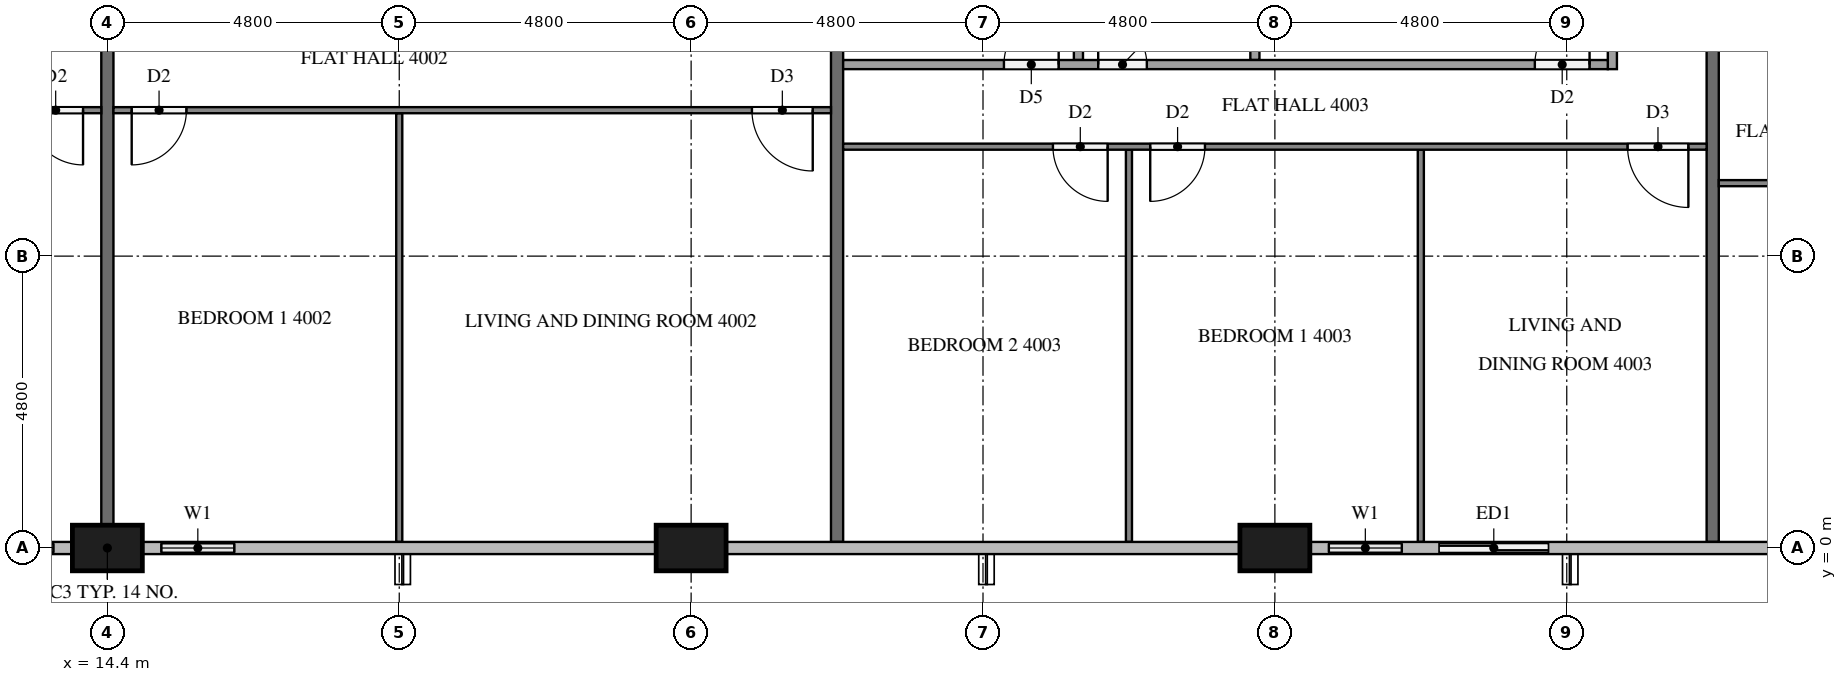
"""IFC4 building model, lengths in metres.
Left out: names, types, materials, properties, quantities, classifications, styles, units other than length and angle.
Written with IfcOpenShell. Run it as: python <this file> out.ifc"""

import sys

from ifc_helpers import new_model, si_unit, direction, frame, frame_2d, origin, origin_2d, place, context, subcontext, project, spatial, rectangle, extrude, element, fill, save


model = new_model("IFC4")
c1 = context("Model", 3, precision=1e-05, world=origin(), true_north=direction((0.0, 1.0)))
c2 = subcontext(c1, "Body", "Model", "MODEL_VIEW")
j1 = project(units=[si_unit("LENGTHUNIT", "METRE"), si_unit("PLANEANGLEUNIT", "RADIAN")], contexts=[c1])
p1 = place(None, origin())
s1 = spatial("IfcSite", under=j1, at=p1, CompositionType="ELEMENT")
p2 = place(p1, origin())
s2 = spatial("IfcBuilding", under=s1, at=p2, CompositionType="ELEMENT")
p3 = place(p2, frame((0.0, 0.0, 156.0)))
s3 = spatial("IfcBuildingStorey", under=s2, at=p3, CompositionType="ELEMENT", Elevation=156.0)
for number, where, z_axis, x_axis in (
    (1, (14.4, 0.0, 0.0), (0.0, 0.0, 1.0), (1.0, 0.0, 0.0)),
    (2, (24.0, 0.0, 0.0), (0.0, 0.0, 1.0), (1.0, 0.0, 0.0)),
    (3, (33.6, 0.0, 0.0), (0.0, 0.0, 1.0), (1.0, 0.0, 0.0)),
):
    element("IfcColumn", number, at=place(p3, frame(where, z_axis=z_axis, x_axis=x_axis)), inside=s3, PredefinedType="COLUMN", context=c2, shape_type="SweptSolid", body=[
        extrude(rectangle(XDim=1.15, YDim=0.75, at=origin_2d()), origin(), (0.0, 0.0, 1.0), 3.2),
    ])
p4 = place(p3, frame((12.0, 0.0, 0.0), z_axis=(0.0, 0.0, 1.0), x_axis=(1.0, 0.0, 0.0)))
e4 = element("IfcWall", 4, at=p4, inside=s3, PredefinedType="SOLIDWALL", context=c2, shape_type="SweptSolid", body=[
    extrude(rectangle(XDim=1.825, YDim=0.15, at=frame_2d((0.913, 0.0))), origin(), (0.0, 0.0, 1.0), 3.2),
])
p5 = place(p4, frame((0.312, 0.0, 0.9)))
e5 = element("IfcOpeningElement", 5, at=p5, cuts=e4, PredefinedType="OPENING", context=c2, shape_type="SweptSolid", body=[
    extrude(rectangle(XDim=1.2, YDim=1.4, at=frame_2d((0.6, 0.7))), frame((0.0, 0.085, 0.0), z_axis=(0.0, -1.0, 0.0), x_axis=(1.0, 0.0, 0.0)), (0.0, 0.0, 1.0), 0.17),
])
p6 = place(p3, frame((14.975, 0.0, 0.0), z_axis=(0.0, 0.0, 1.0), x_axis=(1.0, 0.0, 0.0)))
e6 = element("IfcWall", 6, at=p6, inside=s3, PredefinedType="SOLIDWALL", context=c2, shape_type="SweptSolid", body=[
    extrude(rectangle(XDim=1.825, YDim=0.15, at=frame_2d((0.913, 0.0))), origin(), (0.0, 0.0, 1.0), 3.2),
])
p7 = place(p6, frame((0.312, 0.0, 0.9)))
e7 = element("IfcOpeningElement", 7, at=p7, cuts=e6, PredefinedType="OPENING", context=c2, shape_type="SweptSolid", body=[
    extrude(rectangle(XDim=1.2, YDim=1.4, at=frame_2d((0.6, 0.7))), frame((0.0, 0.085, 0.0), z_axis=(0.0, -1.0, 0.0), x_axis=(1.0, 0.0, 0.0)), (0.0, 0.0, 1.0), 0.17),
])
p8 = place(p3, frame((34.175, 0.0, 0.0), z_axis=(0.0, 0.0, 1.0), x_axis=(1.0, 0.0, 0.0)))
e8 = element("IfcWall", 8, at=p8, inside=s3, PredefinedType="SOLIDWALL", context=c2, shape_type="SweptSolid", body=[
    extrude(rectangle(XDim=4.225, YDim=0.15, at=frame_2d((2.112, 0.0))), origin(), (0.0, 0.0, 1.0), 3.2),
])
p9 = place(p8, frame((0.312, 0.0, 0.9)))
e9 = element("IfcOpeningElement", 9, at=p9, cuts=e8, PredefinedType="OPENING", context=c2, shape_type="SweptSolid", body=[
    extrude(rectangle(XDim=1.2, YDim=1.4, at=frame_2d((0.6, 0.7))), frame((0.0, 0.085, 0.0), z_axis=(0.0, -1.0, 0.0), x_axis=(1.0, 0.0, 0.0)), (0.0, 0.0, 1.0), 0.17),
])
p10 = place(p8, frame((2.125, 0.0, 0.0)))
e10 = element("IfcOpeningElement", 10, at=p10, cuts=e8, PredefinedType="OPENING", context=c2, shape_type="SweptSolid", body=[
    extrude(rectangle(XDim=1.8, YDim=2.4, at=frame_2d((0.9, 1.2))), frame((0.0, 0.085, 0.0), z_axis=(0.0, -1.0, 0.0), x_axis=(1.0, 0.0, 0.0)), (0.0, 0.0, 1.0), 0.17),
])
p11 = place(p3, frame((14.4, 11.9, 0.0), z_axis=(0.0, 0.0, 1.0), x_axis=(0.0, -1.0, 0.0)))
e11 = element("IfcWall", 11, at=p11, inside=s3, PredefinedType="PARTITIONING", context=c2, shape_type="SweptSolid", body=[
    extrude(rectangle(XDim=11.525, YDim=0.2, at=frame_2d((5.762, 0.0))), origin(), (0.0, 0.0, 1.0), 3.2),
])
for number, where, z_axis, x_axis in (
    (12, (26.4, 11.9, 0.0), (0.0, 0.0, 1.0), (0.0, -1.0, 0.0)),
    (13, (40.8, 11.9, 0.0), (0.0, 0.0, 1.0), (0.0, -1.0, 0.0)),
):
    element("IfcWall", number, at=place(p3, frame(where, z_axis=z_axis, x_axis=x_axis)), inside=s3, PredefinedType="PARTITIONING", context=c2, shape_type="SweptSolid", body=[
        extrude(rectangle(XDim=11.8, YDim=0.2, at=frame_2d((5.9, 0.0))), origin(), (0.0, 0.0, 1.0), 3.2),
    ])
p12 = place(p3, frame((14.3, 7.2, 0.0), z_axis=(0.0, 0.0, 1.0), x_axis=(-1.0, 0.0, 0.0)))
e14 = element("IfcWall", 14, at=p12, inside=s3, PredefinedType="PARTITIONING", context=c2, shape_type="SweptSolid", body=[
    extrude(rectangle(XDim=14.2, YDim=0.1, at=frame_2d((7.1, 0.0))), origin(), (0.0, 0.0, 1.0), 3.2),
])
p13 = place(p12, frame((0.3, 0.0, 0.0)))
e15 = element("IfcOpeningElement", 15, at=p13, cuts=e14, PredefinedType="OPENING", context=c2, shape_type="SweptSolid", body=[
    extrude(rectangle(XDim=0.9, YDim=2.1, at=frame_2d((0.45, 1.05))), frame((0.0, 0.06, 0.0), z_axis=(0.0, -1.0, 0.0), x_axis=(1.0, 0.0, 0.0)), (0.0, 0.0, 1.0), 0.12),
])
p14 = place(p12, frame((8.25, 0.0, 0.0)))
e16 = element("IfcOpeningElement", 16, at=p14, cuts=e14, PredefinedType="OPENING", context=c2, shape_type="SweptSolid", body=[
    extrude(rectangle(XDim=0.9, YDim=2.1, at=frame_2d((0.45, 1.05))), frame((0.0, 0.06, 0.0), z_axis=(0.0, -1.0, 0.0), x_axis=(1.0, 0.0, 0.0)), (0.0, 0.0, 1.0), 0.12),
])
p15 = place(p12, frame((9.85, 0.0, 0.0)))
e17 = element("IfcOpeningElement", 17, at=p15, cuts=e14, PredefinedType="OPENING", context=c2, shape_type="SweptSolid", body=[
    extrude(rectangle(XDim=1.0, YDim=2.1, at=frame_2d((0.5, 1.05))), frame((0.0, 0.06, 0.0), z_axis=(0.0, -1.0, 0.0), x_axis=(1.0, 0.0, 0.0)), (0.0, 0.0, 1.0), 0.12),
])
p16 = place(p3, frame((19.2, 7.15, 0.0), z_axis=(0.0, 0.0, 1.0), x_axis=(0.0, -1.0, 0.0)))
e18 = element("IfcWall", 18, at=p16, inside=s3, PredefinedType="PARTITIONING", context=c2, shape_type="SweptSolid", body=[
    extrude(rectangle(XDim=7.05, YDim=0.1, at=frame_2d((3.525, 0.0))), origin(), (0.0, 0.0, 1.0), 3.2),
])
p17 = place(p3, frame((26.3, 7.2, 0.0), z_axis=(0.0, 0.0, 1.0), x_axis=(-1.0, 0.0, 0.0)))
e19 = element("IfcWall", 19, at=p17, inside=s3, PredefinedType="PARTITIONING", context=c2, shape_type="SweptSolid", body=[
    extrude(rectangle(XDim=11.8, YDim=0.1, at=frame_2d((5.9, 0.0))), origin(), (0.0, 0.0, 1.0), 3.2),
])
p18 = place(p17, frame((10.6, 0.0, 0.0)))
e20 = element("IfcOpeningElement", 20, at=p18, cuts=e19, PredefinedType="OPENING", context=c2, shape_type="SweptSolid", body=[
    extrude(rectangle(XDim=0.9, YDim=2.1, at=frame_2d((0.45, 1.05))), frame((0.0, 0.06, 0.0), z_axis=(0.0, -1.0, 0.0), x_axis=(1.0, 0.0, 0.0)), (0.0, 0.0, 1.0), 0.12),
])
p19 = place(p17, frame((0.3, 0.0, 0.0)))
e21 = element("IfcOpeningElement", 21, at=p19, cuts=e19, PredefinedType="OPENING", context=c2, shape_type="SweptSolid", body=[
    extrude(rectangle(XDim=1.0, YDim=2.1, at=frame_2d((0.5, 1.05))), frame((0.0, 0.06, 0.0), z_axis=(0.0, -1.0, 0.0), x_axis=(1.0, 0.0, 0.0)), (0.0, 0.0, 1.0), 0.12),
])
for number, where, z_axis, x_axis in (
    (22, (36.0, 6.55, 0.0), (0.0, 0.0, 1.0), (0.0, -1.0, 0.0)),
    (23, (31.2, 6.55, 0.0), (0.0, 0.0, 1.0), (0.0, -1.0, 0.0)),
):
    element("IfcWall", number, at=place(p3, frame(where, z_axis=z_axis, x_axis=x_axis)), inside=s3, PredefinedType="PARTITIONING", context=c2, shape_type="SweptSolid", body=[
        extrude(rectangle(XDim=6.45, YDim=0.1, at=frame_2d((3.225, 0.0))), origin(), (0.0, 0.0, 1.0), 3.2),
    ])
p20 = place(p3, frame((40.7, 6.6, 0.0), z_axis=(0.0, 0.0, 1.0), x_axis=(-1.0, 0.0, 0.0)))
e24 = element("IfcWall", 24, at=p20, inside=s3, PredefinedType="PARTITIONING", context=c2, shape_type="SweptSolid", body=[
    extrude(rectangle(XDim=14.2, YDim=0.1, at=frame_2d((7.1, 0.0))), origin(), (0.0, 0.0, 1.0), 3.2),
])
p21 = place(p20, frame((0.3, 0.0, 0.0)))
e25 = element("IfcOpeningElement", 25, at=p21, cuts=e24, PredefinedType="OPENING", context=c2, shape_type="SweptSolid", body=[
    extrude(rectangle(XDim=1.0, YDim=2.1, at=frame_2d((0.5, 1.05))), frame((0.0, 0.06, 0.0), z_axis=(0.0, -1.0, 0.0), x_axis=(1.0, 0.0, 0.0)), (0.0, 0.0, 1.0), 0.12),
])
p22 = place(p20, frame((8.25, 0.0, 0.0)))
e26 = element("IfcOpeningElement", 26, at=p22, cuts=e24, PredefinedType="OPENING", context=c2, shape_type="SweptSolid", body=[
    extrude(rectangle(XDim=0.9, YDim=2.1, at=frame_2d((0.45, 1.05))), frame((0.0, 0.06, 0.0), z_axis=(0.0, -1.0, 0.0), x_axis=(1.0, 0.0, 0.0)), (0.0, 0.0, 1.0), 0.12),
])
p23 = place(p20, frame((9.85, 0.0, 0.0)))
e27 = element("IfcOpeningElement", 27, at=p23, cuts=e24, PredefinedType="OPENING", context=c2, shape_type="SweptSolid", body=[
    extrude(rectangle(XDim=0.9, YDim=2.1, at=frame_2d((0.45, 1.05))), frame((0.0, 0.06, 0.0), z_axis=(0.0, -1.0, 0.0), x_axis=(1.0, 0.0, 0.0)), (0.0, 0.0, 1.0), 0.12),
])
for number, where, z_axis, x_axis in (
    (28, (33.271, 11.9, 0.0), (0.0, 0.0, 1.0), (0.0, -1.0, 0.0)),
    (29, (30.369, 11.9, 0.0), (0.0, 0.0, 1.0), (0.0, -1.0, 0.0)),
):
    element("IfcWall", number, at=place(p3, frame(where, z_axis=z_axis, x_axis=x_axis)), inside=s3, PredefinedType="PARTITIONING", context=c2, shape_type="SweptSolid", body=[
        extrude(rectangle(XDim=3.875, YDim=0.15, at=frame_2d((1.938, 0.0))), origin(), (0.0, 0.0, 1.0), 3.2),
    ])
p24 = place(p3, frame((39.15, 11.9, 0.0), z_axis=(0.0, 0.0, 1.0), x_axis=(0.0, -1.0, 0.0)))
e30 = element("IfcWall", 30, at=p24, inside=s3, PredefinedType="PARTITIONING", context=c2, shape_type="SweptSolid", body=[
    extrude(rectangle(XDim=4.025, YDim=0.15, at=frame_2d((2.012, 0.0))), origin(), (0.0, 0.0, 1.0), 3.2),
])
p25 = place(p3, frame((26.5, 7.95, 0.0), z_axis=(0.0, 0.0, 1.0), x_axis=(1.0, 0.0, 0.0)))
e31 = element("IfcWall", 31, at=p25, inside=s3, PredefinedType="PARTITIONING", context=c2, shape_type="SweptSolid", body=[
    extrude(rectangle(XDim=12.575, YDim=0.15, at=frame_2d((6.288, 0.0))), origin(), (0.0, 0.0, 1.0), 3.2),
])
p26 = place(p25, frame((11.375, 0.0, 0.0)))
e32 = element("IfcOpeningElement", 32, at=p26, cuts=e31, PredefinedType="OPENING", context=c2, shape_type="SweptSolid", body=[
    extrude(rectangle(XDim=0.9, YDim=2.1, at=frame_2d((0.45, 1.05))), frame((0.0, 0.085, 0.0), z_axis=(0.0, -1.0, 0.0), x_axis=(1.0, 0.0, 0.0)), (0.0, 0.0, 1.0), 0.17),
])
p27 = place(p25, frame((4.194, 0.0, 0.0)))
e33 = element("IfcOpeningElement", 33, at=p27, cuts=e31, PredefinedType="OPENING", context=c2, shape_type="SweptSolid", body=[
    extrude(rectangle(XDim=0.8, YDim=2.1, at=frame_2d((0.4, 1.05))), frame((0.0, 0.085, 0.0), z_axis=(0.0, -1.0, 0.0), x_axis=(1.0, 0.0, 0.0)), (0.0, 0.0, 1.0), 0.17),
])
p28 = place(p25, frame((2.644, 0.0, 0.0)))
e34 = element("IfcOpeningElement", 34, at=p28, cuts=e31, PredefinedType="OPENING", context=c2, shape_type="SweptSolid", body=[
    extrude(rectangle(XDim=0.9, YDim=2.1, at=frame_2d((0.45, 1.05))), frame((0.0, 0.085, 0.0), z_axis=(0.0, -1.0, 0.0), x_axis=(1.0, 0.0, 0.0)), (0.0, 0.0, 1.0), 0.17),
])
p29 = place(p3, frame((57.5, 6.0, 0.0), z_axis=(0.0, 0.0, 1.0), x_axis=(-1.0, 0.0, 0.0)))
e35 = element("IfcWall", 35, at=p29, inside=s3, PredefinedType="PARTITIONING", context=c2, shape_type="SweptSolid", body=[
    extrude(rectangle(XDim=16.6, YDim=0.1, at=frame_2d((8.3, 0.0))), origin(), (0.0, 0.0, 1.0), 3.2),
])
p30 = place(p29, frame((9.85, 0.0, 0.0)))
e36 = element("IfcOpeningElement", 36, at=p30, cuts=e35, PredefinedType="OPENING", context=c2, shape_type="SweptSolid", body=[
    extrude(rectangle(XDim=1.0, YDim=2.1, at=frame_2d((0.5, 1.05))), frame((0.0, 0.06, 0.0), z_axis=(0.0, -1.0, 0.0), x_axis=(1.0, 0.0, 0.0)), (0.0, 0.0, 1.0), 0.12),
])
p31 = place(p29, frame((8.25, 0.0, 0.0)))
e37 = element("IfcOpeningElement", 37, at=p31, cuts=e35, PredefinedType="OPENING", context=c2, shape_type="SweptSolid", body=[
    extrude(rectangle(XDim=0.9, YDim=2.1, at=frame_2d((0.45, 1.05))), frame((0.0, 0.06, 0.0), z_axis=(0.0, -1.0, 0.0), x_axis=(1.0, 0.0, 0.0)), (0.0, 0.0, 1.0), 0.12),
])
p32 = place(p29, frame((0.5, 0.0, 0.0)))
e38 = element("IfcOpeningElement", 38, at=p32, cuts=e35, PredefinedType="OPENING", context=c2, shape_type="SweptSolid", body=[
    extrude(rectangle(XDim=0.9, YDim=2.1, at=frame_2d((0.45, 1.05))), frame((0.0, 0.06, 0.0), z_axis=(0.0, -1.0, 0.0), x_axis=(1.0, 0.0, 0.0)), (0.0, 0.0, 1.0), 0.12),
])
p33 = place(p5, origin())
e39 = element("IfcWindow", 39, at=p33, inside=s3, PartitioningType="SINGLE_PANEL", PredefinedType="WINDOW", context=c2, shape_type="SweptSolid", body=[
    extrude(rectangle(XDim=1.2, YDim=1.4, at=frame_2d((0.6, 0.7))), frame((0.0, 0.03, 0.0), z_axis=(0.0, -1.0, 0.0), x_axis=(1.0, 0.0, 0.0)), (0.0, 0.0, 1.0), 0.06),
])
fill(e5, e39)
p34 = place(p7, origin())
e40 = element("IfcWindow", 40, at=p34, inside=s3, PartitioningType="SINGLE_PANEL", PredefinedType="WINDOW", context=c2, shape_type="SweptSolid", body=[
    extrude(rectangle(XDim=1.2, YDim=1.4, at=frame_2d((0.6, 0.7))), frame((0.0, 0.03, 0.0), z_axis=(0.0, -1.0, 0.0), x_axis=(1.0, 0.0, 0.0)), (0.0, 0.0, 1.0), 0.06),
])
fill(e7, e40)
p35 = place(p9, origin())
e41 = element("IfcWindow", 41, at=p35, inside=s3, PartitioningType="SINGLE_PANEL", PredefinedType="WINDOW", context=c2, shape_type="SweptSolid", body=[
    extrude(rectangle(XDim=1.2, YDim=1.4, at=frame_2d((0.6, 0.7))), frame((0.0, 0.03, 0.0), z_axis=(0.0, -1.0, 0.0), x_axis=(1.0, 0.0, 0.0)), (0.0, 0.0, 1.0), 0.06),
])
fill(e9, e41)
p36 = place(p10, origin())
e42 = element("IfcDoor", 42, at=p36, inside=s3, OperationType="SLIDING_TO_LEFT", PredefinedType="DOOR", context=c2, shape_type="SweptSolid", body=[
    extrude(rectangle(XDim=1.8, YDim=2.4, at=frame_2d((0.9, 1.2))), frame((0.0, 0.025, 0.0), z_axis=(0.0, -1.0, 0.0), x_axis=(1.0, 0.0, 0.0)), (0.0, 0.0, 1.0), 0.05),
])
fill(e10, e42)
p37 = place(p13, origin())
e43 = element("IfcDoor", 43, at=p37, inside=s3, OperationType="SINGLE_SWING_LEFT", PredefinedType="DOOR", context=c2, shape_type="SweptSolid", body=[
    extrude(rectangle(XDim=0.9, YDim=2.1, at=frame_2d((0.45, 1.05))), frame((0.0, 0.025, 0.0), z_axis=(0.0, -1.0, 0.0), x_axis=(1.0, 0.0, 0.0)), (0.0, 0.0, 1.0), 0.05),
])
fill(e15, e43)
p38 = place(p18, origin())
e44 = element("IfcDoor", 44, at=p38, inside=s3, OperationType="SINGLE_SWING_RIGHT", PredefinedType="DOOR", context=c2, shape_type="SweptSolid", body=[
    extrude(rectangle(XDim=0.9, YDim=2.1, at=frame_2d((0.45, 1.05))), frame((0.0, 0.025, 0.0), z_axis=(0.0, -1.0, 0.0), x_axis=(1.0, 0.0, 0.0)), (0.0, 0.0, 1.0), 0.05),
])
fill(e20, e44)
p39 = place(p19, origin())
e45 = element("IfcDoor", 45, at=p39, inside=s3, OperationType="SINGLE_SWING_LEFT", PredefinedType="DOOR", context=c2, shape_type="SweptSolid", body=[
    extrude(rectangle(XDim=1.0, YDim=2.1, at=frame_2d((0.5, 1.05))), frame((0.0, 0.025, 0.0), z_axis=(0.0, -1.0, 0.0), x_axis=(1.0, 0.0, 0.0)), (0.0, 0.0, 1.0), 0.05),
])
fill(e21, e45)
p40 = place(p21, origin())
e46 = element("IfcDoor", 46, at=p40, inside=s3, OperationType="SINGLE_SWING_LEFT", PredefinedType="DOOR", context=c2, shape_type="SweptSolid", body=[
    extrude(rectangle(XDim=1.0, YDim=2.1, at=frame_2d((0.5, 1.05))), frame((0.0, 0.025, 0.0), z_axis=(0.0, -1.0, 0.0), x_axis=(1.0, 0.0, 0.0)), (0.0, 0.0, 1.0), 0.05),
])
fill(e25, e46)
p41 = place(p22, origin())
e47 = element("IfcDoor", 47, at=p41, inside=s3, OperationType="SINGLE_SWING_RIGHT", PredefinedType="DOOR", context=c2, shape_type="SweptSolid", body=[
    extrude(rectangle(XDim=0.9, YDim=2.1, at=frame_2d((0.45, 1.05))), frame((0.0, 0.025, 0.0), z_axis=(0.0, -1.0, 0.0), x_axis=(1.0, 0.0, 0.0)), (0.0, 0.0, 1.0), 0.05),
])
fill(e26, e47)
p42 = place(p23, origin())
e48 = element("IfcDoor", 48, at=p42, inside=s3, OperationType="SINGLE_SWING_LEFT", PredefinedType="DOOR", context=c2, shape_type="SweptSolid", body=[
    extrude(rectangle(XDim=0.9, YDim=2.1, at=frame_2d((0.45, 1.05))), frame((0.0, 0.025, 0.0), z_axis=(0.0, -1.0, 0.0), x_axis=(1.0, 0.0, 0.0)), (0.0, 0.0, 1.0), 0.05),
])
fill(e27, e48)
p43 = place(p26, origin())
e49 = element("IfcDoor", 49, at=p43, inside=s3, OperationType="SINGLE_SWING_RIGHT", PredefinedType="DOOR", context=c2, shape_type="SweptSolid", body=[
    extrude(rectangle(XDim=0.9, YDim=2.1, at=frame_2d((0.45, 1.05))), frame((0.0, 0.025, 0.0), z_axis=(0.0, -1.0, 0.0), x_axis=(1.0, 0.0, 0.0)), (0.0, 0.0, 1.0), 0.05),
])
fill(e32, e49)
p44 = place(p27, origin())
e50 = element("IfcDoor", 50, at=p44, inside=s3, OperationType="SINGLE_SWING_LEFT", PredefinedType="DOOR", context=c2, shape_type="SweptSolid", body=[
    extrude(rectangle(XDim=0.8, YDim=2.1, at=frame_2d((0.4, 1.05))), frame((0.0, 0.025, 0.0), z_axis=(0.0, -1.0, 0.0), x_axis=(1.0, 0.0, 0.0)), (0.0, 0.0, 1.0), 0.05),
])
fill(e33, e50)
p45 = place(p28, origin())
e51 = element("IfcDoor", 51, at=p45, inside=s3, OperationType="SINGLE_SWING_RIGHT", PredefinedType="DOOR", context=c2, shape_type="SweptSolid", body=[
    extrude(rectangle(XDim=0.9, YDim=2.1, at=frame_2d((0.45, 1.05))), frame((0.0, 0.025, 0.0), z_axis=(0.0, -1.0, 0.0), x_axis=(1.0, 0.0, 0.0)), (0.0, 0.0, 1.0), 0.05),
])
fill(e34, e51)
save(model, sys.argv[1])
